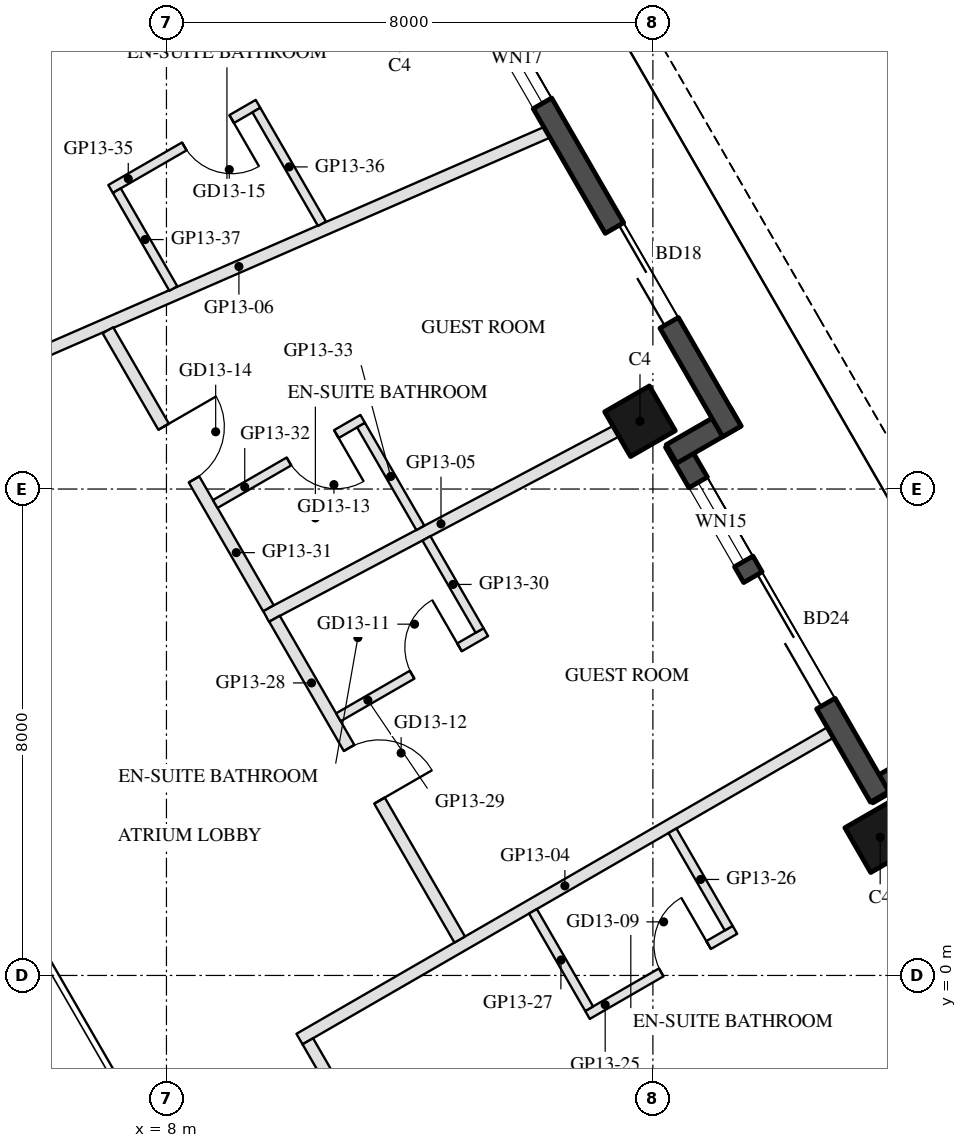
"""IFC4 building model, lengths in metres.
Left out: names, types, materials, properties, quantities, classifications, styles, units other than length and angle.
Written with IfcOpenShell. Run it as: python <this file> out.ifc"""

import sys

from ifc_helpers import new_model, si_unit, direction, frame, frame_2d, origin, origin_2d, place, context, subcontext, project, spatial, rectangle, hollow_rectangle, extrude, element, fill, save


model = new_model("IFC4")
c1 = context("Model", 3, precision=1e-05, world=origin(), true_north=direction((0.0, 1.0)))
c2 = subcontext(c1, "Body", "Model", "MODEL_VIEW")
j1 = project(units=[si_unit("LENGTHUNIT", "METRE"), si_unit("PLANEANGLEUNIT", "RADIAN")], contexts=[c1])
p1 = place(None, origin())
s1 = spatial("IfcSite", under=j1, at=p1, CompositionType="ELEMENT")
p2 = place(p1, origin())
s2 = spatial("IfcBuilding", under=s1, at=p2, CompositionType="ELEMENT")
p3 = place(p2, frame((0.0, 0.0, 157.7)))
s3 = spatial("IfcBuildingStorey", under=s2, at=p3, CompositionType="ELEMENT", Elevation=157.7)
for number, where, z_axis, x_axis in (
    (1, (19.738, 2.273, 0.0), (0.0, 0.0, 1.0), (-0.5, 0.866, 0.0)),
    (2, (15.788, 9.115, 0.0), (0.0, 0.0, 1.0), (-0.5, 0.866, 0.0)),
):
    element("IfcColumn", number, at=place(p3, frame(where, z_axis=z_axis, x_axis=x_axis)), inside=s3, PredefinedType="COLUMN", context=c2, shape_type="SweptSolid", body=[
        extrude(hollow_rectangle(XDim=0.85, YDim=0.85, WallThickness=0.04, at=origin_2d()), origin(), (0.0, 0.0, 1.0), 3.7),
    ])
p4 = place(p3, frame((20.588, 3.601, 0.0), z_axis=(0.0, 0.0, 1.0), x_axis=(-0.866005645448, -0.500034220881, 0.0)))
e3 = element("IfcWall", 3, at=p4, inside=s3, PredefinedType="SOLIDWALL", context=c2, shape_type="SweptSolid", body=[
    extrude(rectangle(XDim=1.22, YDim=0.35, at=frame_2d((0.61, 0.0))), origin(), (0.0, 0.0, 1.0), 3.55),
])
p5 = place(p3, frame((19.729, 2.938, 0.0), z_axis=(0.0, 0.0, 1.0), x_axis=(-0.499976430342, 0.866039011305, 0.0)))
e4 = element("IfcWall", 4, at=p5, inside=s3, PredefinedType="SOLIDWALL", context=c2, shape_type="SweptSolid", body=[
    extrude(rectangle(XDim=6.74, YDim=0.35, at=frame_2d((3.37, 0.0))), origin(), (0.0, 0.0, 1.0), 3.55),
])
p6 = place(p5, frame((1.77, 0.0, 0.0)))
e5 = element("IfcOpeningElement", 5, at=p6, cuts=e4, PredefinedType="OPENING", context=c2, shape_type="SweptSolid", body=[
    extrude(rectangle(XDim=2.4, YDim=2.4, at=frame_2d((1.2, 1.2))), frame((0.0, 0.185, 0.0), z_axis=(0.0, -1.0, 0.0), x_axis=(1.0, 0.0, 0.0)), (0.0, 0.0, 1.0), 0.37),
])
p7 = place(p5, frame((4.47, 0.0, 0.3)))
e6 = element("IfcOpeningElement", 6, at=p7, cuts=e4, PredefinedType="OPENING", context=c2, shape_type="SweptSolid", body=[
    extrude(rectangle(XDim=1.5, YDim=2.65, at=frame_2d((0.75, 1.325))), frame((0.0, 0.185, 0.0), z_axis=(0.0, -1.0, 0.0), x_axis=(1.0, 0.0, 0.0)), (0.0, 0.0, 1.0), 0.37),
])
p8 = place(p3, frame((16.306, 8.577, 0.0), z_axis=(0.0, 0.0, 1.0), x_axis=(0.866092288191, 0.499884134912, 0.0)))
e7 = element("IfcWall", 7, at=p8, inside=s3, PredefinedType="SOLIDWALL", context=c2, shape_type="SweptSolid", body=[
    extrude(rectangle(XDim=1.22, YDim=0.35, at=frame_2d((0.61, 0.0))), origin(), (0.0, 0.0, 1.0), 3.55),
])
p9 = place(p3, frame((17.299, 8.948, 0.0), z_axis=(0.0, 0.0, 1.0), x_axis=(-0.500010041276, 0.866019606374, 0.0)))
e8 = element("IfcWall", 8, at=p9, inside=s3, PredefinedType="SOLIDWALL", context=c2, shape_type="SweptSolid", body=[
    extrude(rectangle(XDim=9.7, YDim=0.35, at=frame_2d((4.85, 0.0))), origin(), (0.0, 0.0, 1.0), 3.55),
])
p10 = place(p9, frame((2.062, 0.0, 0.0)))
e9 = element("IfcOpeningElement", 9, at=p10, cuts=e8, PredefinedType="OPENING", context=c2, shape_type="SweptSolid", body=[
    extrude(rectangle(XDim=1.8, YDim=2.4, at=frame_2d((0.9, 1.2))), frame((0.0, 0.185, 0.0), z_axis=(0.0, -1.0, 0.0), x_axis=(1.0, 0.0, 0.0)), (0.0, 0.0, 1.0), 0.37),
])
p11 = place(p9, frame((6.23, 0.0, 0.3)))
e10 = element("IfcOpeningElement", 10, at=p11, cuts=e8, PredefinedType="OPENING", context=c2, shape_type="SweptSolid", body=[
    extrude(rectangle(XDim=1.7, YDim=2.65, at=frame_2d((0.85, 1.325))), frame((0.0, 0.185, 0.0), z_axis=(0.0, -1.0, 0.0), x_axis=(1.0, 0.0, 0.0)), (0.0, 0.0, 1.0), 0.37),
])
p12 = place(p3, frame((18.917, 3.994, 0.0), z_axis=(0.0, 0.0, 1.0), x_axis=(-0.866022637375, -0.500004791531, 0.0)))
e11 = element("IfcWall", 11, at=p12, inside=s3, PredefinedType="PARTITIONING", context=c2, shape_type="SweptSolid", body=[
    extrude(rectangle(XDim=10.08, YDim=0.2, at=frame_2d((5.04, 0.0))), origin(), (0.0, 0.0, 1.0), 3.06),
])
p13 = place(p3, frame((15.392, 8.95, 0.0), z_axis=(0.0, 0.0, 1.0), x_axis=(-0.883969397176, -0.467544762408, 0.0)))
e12 = element("IfcWall", 12, at=p13, inside=s3, PredefinedType="PARTITIONING", context=c2, shape_type="SweptSolid", body=[
    extrude(rectangle(XDim=6.51, YDim=0.2, at=frame_2d((3.255, 0.0))), origin(), (0.0, 0.0, 1.0), 2.95),
])
p14 = place(p3, frame((14.257, 13.866, 0.0), z_axis=(0.0, 0.0, 1.0), x_axis=(-0.916761733334, -0.399434505638, 0.0)))
e13 = element("IfcWall", 13, at=p14, inside=s3, PredefinedType="PARTITIONING", context=c2, shape_type="SweptSolid", body=[
    extrude(rectangle(XDim=11.05, YDim=0.2, at=frame_2d((5.525, 0.0))), origin(), (0.0, 0.0, 1.0), 3.06),
])
p15 = place(p3, frame((10.325, -1.083, 0.0), z_axis=(0.0, 0.0, 1.0), x_axis=(0.500008716408, -0.866020371305, 0.0)))
e14 = element("IfcWall", 14, at=p15, inside=s3, PredefinedType="PARTITIONING", context=c2, shape_type="SweptSolid", body=[
    extrude(rectangle(XDim=3.888, YDim=0.2, at=frame_2d((1.944, 0.0))), origin(), (0.0, 0.0, 1.0), 2.95),
])
p16 = place(p15, frame((1.444, 0.0, 0.0)))
e15 = element("IfcOpeningElement", 15, at=p16, cuts=e14, PredefinedType="OPENING", context=c2, shape_type="SweptSolid", body=[
    extrude(rectangle(XDim=1.0, YDim=2.1, at=frame_2d((0.5, 1.05))), frame((0.0, 0.11, 0.0), z_axis=(0.0, -1.0, 0.0), x_axis=(1.0, 0.0, 0.0)), (0.0, 0.0, 1.0), 0.22),
])
p17 = place(p3, frame((14.924, -0.65, 0.0), z_axis=(0.0, 0.0, 1.0), x_axis=(0.866056369097, 0.49994636267, 0.0)))
e16 = element("IfcWall", 16, at=p17, inside=s3, PredefinedType="PARTITIONING", context=c2, shape_type="SweptSolid", body=[
    extrude(rectangle(XDim=2.8, YDim=0.15, at=frame_2d((1.4, 0.0))), origin(), (0.0, 0.0, 1.0), 2.95),
])
p18 = place(p17, frame((1.4, 0.0, 0.0)))
e17 = element("IfcOpeningElement", 17, at=p18, cuts=e16, PredefinedType="OPENING", context=c2, shape_type="SweptSolid", body=[
    extrude(rectangle(XDim=0.9, YDim=2.1, at=frame_2d((0.45, 1.05))), frame((0.0, 0.085, 0.0), z_axis=(0.0, -1.0, 0.0), x_axis=(1.0, 0.0, 0.0)), (0.0, 0.0, 1.0), 0.17),
])
for number, where, z_axis, x_axis in (
    (18, (17.247, 0.778, 0.0), (0.0, 0.0, 1.0), (-0.5, 0.866, 0.0)),
    (19, (14.952, -0.547, 0.0), (0.0, 0.0, 1.0), (-0.5, 0.866, 0.0)),
):
    element("IfcWall", number, at=place(p3, frame(where, z_axis=z_axis, x_axis=x_axis)), inside=s3, PredefinedType="PARTITIONING", context=c2, shape_type="SweptSolid", body=[
        extrude(rectangle(XDim=1.85, YDim=0.15, at=frame_2d((0.925, 0.0))), origin(), (0.0, 0.0, 1.0), 2.95),
    ])
p19 = place(p3, frame((9.777, 5.867, 0.0), z_axis=(0.0, 0.0, 1.0), x_axis=(0.499996493545, -0.866027428228, 0.0)))
e20 = element("IfcWall", 20, at=p19, inside=s3, PredefinedType="PARTITIONING", context=c2, shape_type="SweptSolid", body=[
    extrude(rectangle(XDim=6.092, YDim=0.2, at=frame_2d((3.046, 0.0))), origin(), (0.0, 0.0, 1.0), 2.95),
])
p20 = place(p19, frame((2.454, 0.0, 0.0)))
e21 = element("IfcOpeningElement", 21, at=p20, cuts=e20, PredefinedType="OPENING", context=c2, shape_type="SweptSolid", body=[
    extrude(rectangle(XDim=1.0, YDim=2.1, at=frame_2d((0.5, 1.05))), frame((0.0, 0.11, 0.0), z_axis=(0.0, -1.0, 0.0), x_axis=(1.0, 0.0, 0.0)), (0.0, 0.0, 1.0), 0.22),
])
p21 = place(p3, frame((10.827, 4.246, 0.0), z_axis=(0.0, 0.0, 1.0), x_axis=(0.866018616679, 0.500011755427, 0.0)))
e22 = element("IfcWall", 22, at=p21, inside=s3, PredefinedType="PARTITIONING", context=c2, shape_type="SweptSolid", body=[
    extrude(rectangle(XDim=2.8, YDim=0.15, at=frame_2d((1.4, 0.0))), origin(), (0.0, 0.0, 1.0), 3.55),
])
p22 = place(p21, frame((1.4, 0.0, 0.0)))
e23 = element("IfcOpeningElement", 23, at=p22, cuts=e22, PredefinedType="OPENING", context=c2, shape_type="SweptSolid", body=[
    extrude(rectangle(XDim=0.9, YDim=2.1, at=frame_2d((0.45, 1.05))), frame((0.0, 0.085, 0.0), z_axis=(0.0, -1.0, 0.0), x_axis=(1.0, 0.0, 0.0)), (0.0, 0.0, 1.0), 0.17),
])
p23 = place(p3, frame((13.15, 5.674, 0.0), z_axis=(0.0, 0.0, 1.0), x_axis=(-0.500012451049, 0.866018215049, 0.0)))
e24 = element("IfcWall", 24, at=p23, inside=s3, PredefinedType="PARTITIONING", context=c2, shape_type="SweptSolid", body=[
    extrude(rectangle(XDim=1.749, YDim=0.15, at=frame_2d((0.875, 0.0))), origin(), (0.0, 0.0, 1.0), 2.95),
])
p24 = place(p3, frame((7.037, 10.611, 0.0), z_axis=(0.0, 0.0, 1.0), x_axis=(0.500004030971, -0.86602307649, 0.0)))
e25 = element("IfcWall", 25, at=p24, inside=s3, PredefinedType="PARTITIONING", context=c2, shape_type="SweptSolid", body=[
    extrude(rectangle(XDim=5.279, YDim=0.2, at=frame_2d((2.639, 0.0))), origin(), (0.0, 0.0, 1.0), 2.95),
])
p25 = place(p24, frame((1.833, 0.0, 0.0)))
e26 = element("IfcOpeningElement", 26, at=p25, cuts=e25, PredefinedType="OPENING", context=c2, shape_type="SweptSolid", body=[
    extrude(rectangle(XDim=1.0, YDim=2.1, at=frame_2d((0.5, 1.05))), frame((0.0, 0.11, 0.0), z_axis=(0.0, -1.0, 0.0), x_axis=(1.0, 0.0, 0.0)), (0.0, 0.0, 1.0), 0.22),
])
p26 = place(p3, frame((11.227, 9.154, 0.0), z_axis=(0.0, 0.0, 1.0), x_axis=(-0.866034573852, -0.49998411664, 0.0)))
e27 = element("IfcWall", 27, at=p26, inside=s3, PredefinedType="PARTITIONING", context=c2, shape_type="SweptSolid", body=[
    extrude(rectangle(XDim=2.8, YDim=0.15, at=frame_2d((1.4, 0.0))), origin(), (0.0, 0.0, 1.0), 3.55),
])
p27 = place(p26, frame((0.5, 0.0, 0.0)))
e28 = element("IfcOpeningElement", 28, at=p27, cuts=e27, PredefinedType="OPENING", context=c2, shape_type="SweptSolid", body=[
    extrude(rectangle(XDim=0.9, YDim=2.1, at=frame_2d((0.45, 1.05))), frame((0.0, 0.085, 0.0), z_axis=(0.0, -1.0, 0.0), x_axis=(1.0, 0.0, 0.0)), (0.0, 0.0, 1.0), 0.17),
])
p28 = place(p3, frame((12.175, 7.362, 0.0), z_axis=(0.0, 0.0, 1.0), x_axis=(-0.500014901547, 0.866016800201, 0.0)))
e29 = element("IfcWall", 29, at=p28, inside=s3, PredefinedType="PARTITIONING", context=c2, shape_type="SweptSolid", body=[
    extrude(rectangle(XDim=1.951, YDim=0.15, at=frame_2d((0.976, 0.0))), origin(), (0.0, 0.0, 1.0), 3.55),
])
p29 = place(p3, frame((9.506, 14.335, 0.0), z_axis=(0.0, 0.0, 1.0), x_axis=(-0.866056369097, -0.49994636267, 0.0)))
e30 = element("IfcWall", 30, at=p29, inside=s3, PredefinedType="PARTITIONING", context=c2, shape_type="SweptSolid", body=[
    extrude(rectangle(XDim=2.8, YDim=0.15, at=frame_2d((1.4, 0.0))), origin(), (0.0, 0.0, 1.0), 3.55),
])
p30 = place(p29, frame((0.5, 0.0, 0.0)))
e31 = element("IfcOpeningElement", 31, at=p30, cuts=e30, PredefinedType="OPENING", context=c2, shape_type="SweptSolid", body=[
    extrude(rectangle(XDim=0.9, YDim=2.1, at=frame_2d((0.45, 1.05))), frame((0.0, 0.085, 0.0), z_axis=(0.0, -1.0, 0.0), x_axis=(1.0, 0.0, 0.0)), (0.0, 0.0, 1.0), 0.17),
])
p31 = place(p3, frame((10.558, 12.364, 0.0), z_axis=(0.0, 0.0, 1.0), x_axis=(-0.499983569942, 0.866034889475, 0.0)))
e32 = element("IfcWall", 32, at=p31, inside=s3, PredefinedType="PARTITIONING", context=c2, shape_type="SweptSolid", body=[
    extrude(rectangle(XDim=2.158, YDim=0.15, at=frame_2d((1.079, 0.0))), origin(), (0.0, 0.0, 1.0), 3.55),
])
p32 = place(p3, frame((8.113, 11.298, 0.0), z_axis=(0.0, 0.0, 1.0), x_axis=(-0.49995366312, 0.866052154742, 0.0)))
e33 = element("IfcWall", 33, at=p32, inside=s3, PredefinedType="PARTITIONING", context=c2, shape_type="SweptSolid", body=[
    extrude(rectangle(XDim=1.859, YDim=0.15, at=frame_2d((0.929, 0.0))), origin(), (0.0, 0.0, 1.0), 3.55),
])
p33 = place(p6, frame((2.4, 0.0, 0.0), z_axis=(0.0, 0.0, 1.0), x_axis=(-1.0, 0.0, 0.0)))
e34 = element("IfcDoor", 34, at=p33, inside=s3, OperationType="SLIDING_TO_LEFT", PredefinedType="DOOR", context=c2, shape_type="SweptSolid", body=[
    extrude(rectangle(XDim=2.4, YDim=2.4, at=frame_2d((1.2, 1.2))), frame((0.0, 0.025, 0.0), z_axis=(0.0, -1.0, 0.0), x_axis=(1.0, 0.0, 0.0)), (0.0, 0.0, 1.0), 0.05),
])
fill(e5, e34)
p34 = place(p7, origin())
e35 = element("IfcWindow", 35, at=p34, inside=s3, PartitioningType="SINGLE_PANEL", PredefinedType="WINDOW", context=c2, shape_type="SweptSolid", body=[
    extrude(rectangle(XDim=1.5, YDim=2.65, at=frame_2d((0.75, 1.325))), frame((0.0, 0.03, 0.0), z_axis=(0.0, -1.0, 0.0), x_axis=(1.0, 0.0, 0.0)), (0.0, 0.0, 1.0), 0.06),
])
fill(e6, e35)
p35 = place(p10, frame((1.8, 0.0, 0.0), z_axis=(0.0, 0.0, 1.0), x_axis=(-1.0, 0.0, 0.0)))
e36 = element("IfcDoor", 36, at=p35, inside=s3, OperationType="SLIDING_TO_LEFT", PredefinedType="DOOR", context=c2, shape_type="SweptSolid", body=[
    extrude(rectangle(XDim=1.8, YDim=2.4, at=frame_2d((0.9, 1.2))), frame((0.0, 0.025, 0.0), z_axis=(0.0, -1.0, 0.0), x_axis=(1.0, 0.0, 0.0)), (0.0, 0.0, 1.0), 0.05),
])
fill(e9, e36)
p36 = place(p11, origin())
e37 = element("IfcWindow", 37, at=p36, inside=s3, PartitioningType="SINGLE_PANEL", PredefinedType="WINDOW", context=c2, shape_type="SweptSolid", body=[
    extrude(rectangle(XDim=1.7, YDim=2.65, at=frame_2d((0.85, 1.325))), frame((0.0, 0.03, 0.0), z_axis=(0.0, -1.0, 0.0), x_axis=(1.0, 0.0, 0.0)), (0.0, 0.0, 1.0), 0.06),
])
fill(e10, e37)
p37 = place(p18, origin())
e38 = element("IfcDoor", 38, at=p37, inside=s3, OperationType="SINGLE_SWING_RIGHT", PredefinedType="DOOR", context=c2, shape_type="SweptSolid", body=[
    extrude(rectangle(XDim=0.9, YDim=2.1, at=frame_2d((0.45, 1.05))), frame((0.0, 0.025, 0.0), z_axis=(0.0, -1.0, 0.0), x_axis=(1.0, 0.0, 0.0)), (0.0, 0.0, 1.0), 0.05),
])
fill(e17, e38)
p38 = place(p22, origin())
e39 = element("IfcDoor", 39, at=p38, inside=s3, OperationType="SINGLE_SWING_RIGHT", PredefinedType="DOOR", context=c2, shape_type="SweptSolid", body=[
    extrude(rectangle(XDim=0.9, YDim=2.1, at=frame_2d((0.45, 1.05))), frame((0.0, 0.025, 0.0), z_axis=(0.0, -1.0, 0.0), x_axis=(1.0, 0.0, 0.0)), (0.0, 0.0, 1.0), 0.05),
])
fill(e23, e39)
p39 = place(p20, origin())
e40 = element("IfcDoor", 40, at=p39, inside=s3, OperationType="SINGLE_SWING_RIGHT", PredefinedType="DOOR", context=c2, shape_type="SweptSolid", body=[
    extrude(rectangle(XDim=1.0, YDim=2.1, at=frame_2d((0.5, 1.05))), frame((0.0, 0.025, 0.0), z_axis=(0.0, -1.0, 0.0), x_axis=(1.0, 0.0, 0.0)), (0.0, 0.0, 1.0), 0.05),
])
fill(e21, e40)
p40 = place(p27, origin())
e41 = element("IfcDoor", 41, at=p40, inside=s3, OperationType="SINGLE_SWING_LEFT", PredefinedType="DOOR", context=c2, shape_type="SweptSolid", body=[
    extrude(rectangle(XDim=0.9, YDim=2.1, at=frame_2d((0.45, 1.05))), frame((0.0, 0.025, 0.0), z_axis=(0.0, -1.0, 0.0), x_axis=(1.0, 0.0, 0.0)), (0.0, 0.0, 1.0), 0.05),
])
fill(e28, e41)
p41 = place(p25, origin())
e42 = element("IfcDoor", 42, at=p41, inside=s3, OperationType="SINGLE_SWING_LEFT", PredefinedType="DOOR", context=c2, shape_type="SweptSolid", body=[
    extrude(rectangle(XDim=1.0, YDim=2.1, at=frame_2d((0.5, 1.05))), frame((0.0, 0.025, 0.0), z_axis=(0.0, -1.0, 0.0), x_axis=(1.0, 0.0, 0.0)), (0.0, 0.0, 1.0), 0.05),
])
fill(e26, e42)
p42 = place(p30, origin())
e43 = element("IfcDoor", 43, at=p42, inside=s3, OperationType="SINGLE_SWING_LEFT", PredefinedType="DOOR", context=c2, shape_type="SweptSolid", body=[
    extrude(rectangle(XDim=0.9, YDim=2.1, at=frame_2d((0.45, 1.05))), frame((0.0, 0.025, 0.0), z_axis=(0.0, -1.0, 0.0), x_axis=(1.0, 0.0, 0.0)), (0.0, 0.0, 1.0), 0.05),
])
fill(e31, e43)
save(model, sys.argv[1])
